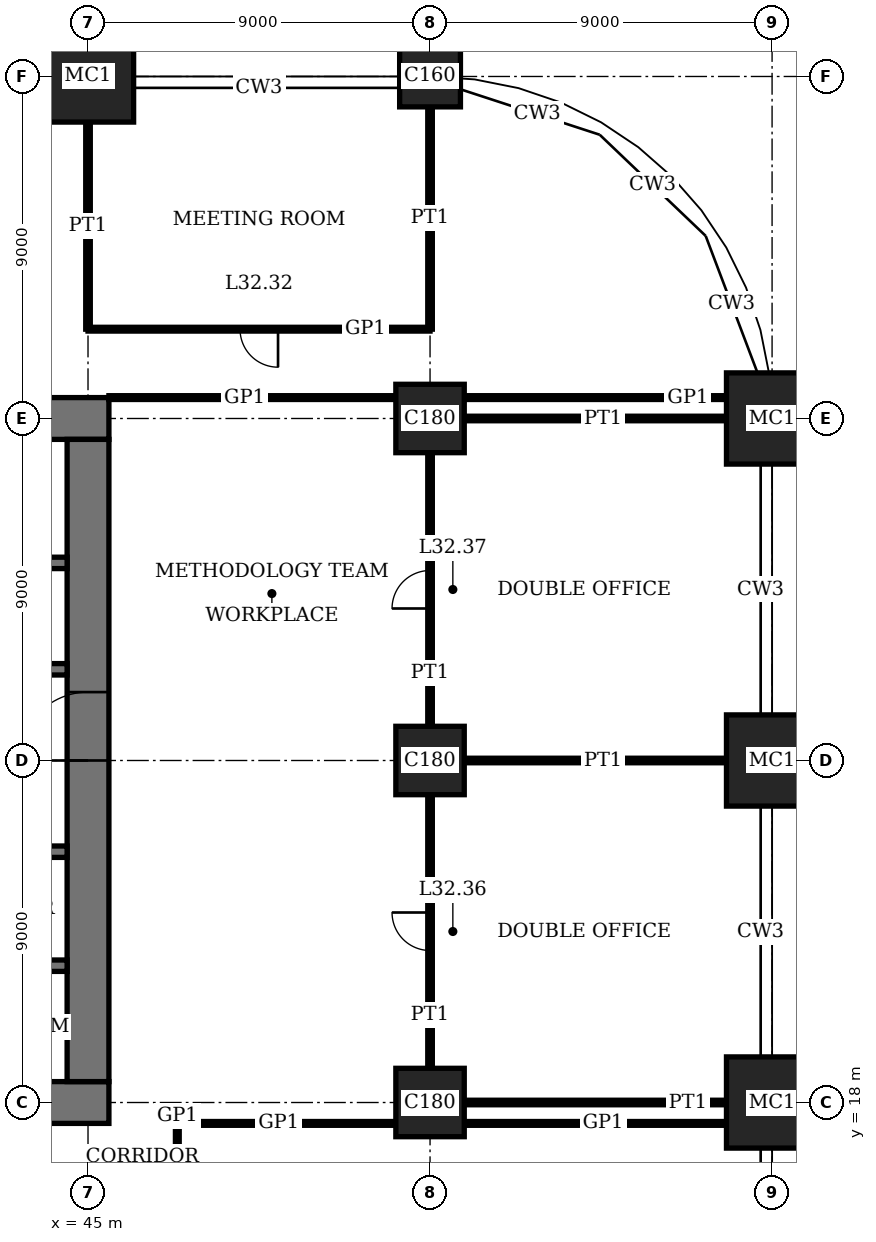
"""IFC4 building model, lengths in metres.
Left out: names, types, materials, properties, quantities, classifications, styles, units other than length and angle.
Written with IfcOpenShell. Run it as: python <this file> out.ifc"""

import sys

from ifc_helpers import new_model, si_unit, direction, frame, frame_2d, origin, origin_2d, place, context, subcontext, project, spatial, rectangle, extrude, element, fill, save


model = new_model("IFC4")
c1 = context("Model", 3, precision=1e-05, world=origin(), true_north=direction((0.0, 1.0)))
c2 = subcontext(c1, "Body", "Model", "MODEL_VIEW")
j1 = project(units=[si_unit("LENGTHUNIT", "METRE"), si_unit("PLANEANGLEUNIT", "RADIAN")], contexts=[c1])
p1 = place(None, origin())
s1 = spatial("IfcSite", under=j1, at=p1, CompositionType="ELEMENT")
p2 = place(p1, origin())
s2 = spatial("IfcBuilding", under=s1, at=p2, CompositionType="ELEMENT")
p3 = place(p2, frame((0.0, 0.0, 133.0)))
s3 = spatial("IfcBuildingStorey", under=s2, at=p3, CompositionType="ELEMENT", Elevation=133.0)
p4 = place(p3, frame((45.0, 45.0, 0.0), z_axis=(0.0, 0.0, 1.0), x_axis=(1.0, 0.0, 0.0)))
e1 = element("IfcColumn", 1, at=p4, inside=s3, PredefinedType="COLUMN", context=c2, shape_type="SweptSolid", body=[
    extrude(rectangle(XDim=2.4, YDim=2.4, at=origin_2d()), origin(), (0.0, 0.0, 1.0), 4.0),
])
for number, where, z_axis, x_axis in (
    (2, (54.0, 18.0, 0.0), (0.0, 0.0, 1.0), (1.0, 0.0, 0.0)),
    (3, (54.0, 27.0, 0.0), (0.0, 0.0, 1.0), (1.0, 0.0, 0.0)),
    (4, (54.0, 36.0, 0.0), (0.0, 0.0, 1.0), (1.0, 0.0, 0.0)),
):
    element("IfcColumn", number, at=place(p3, frame(where, z_axis=z_axis, x_axis=x_axis)), inside=s3, PredefinedType="COLUMN", context=c2, shape_type="SweptSolid", body=[
        extrude(rectangle(XDim=1.8, YDim=1.8, at=origin_2d()), origin(), (0.0, 0.0, 1.0), 4.0),
    ])
p5 = place(p3, frame((54.0, 45.0, 0.0), z_axis=(0.0, 0.0, 1.0), x_axis=(1.0, 0.0, 0.0)))
e5 = element("IfcColumn", 5, at=p5, inside=s3, PredefinedType="COLUMN", context=c2, shape_type="SweptSolid", body=[
    extrude(rectangle(XDim=1.6, YDim=1.6, at=origin_2d()), origin(), (0.0, 0.0, 1.0), 4.0),
])
for number, where, z_axis, x_axis in (
    (6, (63.0, 18.0, 0.0), (0.0, 0.0, 1.0), (1.0, 0.0, 0.0)),
    (7, (63.0, 27.0, 0.0), (0.0, 0.0, 1.0), (1.0, 0.0, 0.0)),
    (8, (63.0, 36.0, 0.0), (0.0, 0.0, 1.0), (1.0, 0.0, 0.0)),
):
    element("IfcColumn", number, at=place(p3, frame(where, z_axis=z_axis, x_axis=x_axis)), inside=s3, PredefinedType="COLUMN", context=c2, shape_type="SweptSolid", body=[
        extrude(rectangle(XDim=2.4, YDim=2.4, at=origin_2d()), origin(), (0.0, 0.0, 1.0), 4.0),
    ])
p6 = place(p3, frame((17.45, 18.0, 0.0), z_axis=(0.0, 0.0, 1.0), x_axis=(1.0, 0.0, 0.0)))
e9 = element("IfcWall", 9, at=p6, inside=s3, PredefinedType="SHEAR", context=c2, shape_type="SweptSolid", body=[
    extrude(rectangle(XDim=28.1, YDim=1.1, at=frame_2d((14.05, 0.0))), origin(), (0.0, 0.0, 1.0), 4.0),
])
p7 = place(p6, frame((11.55, 0.0, 0.0)))
e10 = element("IfcOpeningElement", 10, at=p7, cuts=e9, PredefinedType="OPENING", context=c2, shape_type="SweptSolid", body=[
    extrude(rectangle(XDim=1.0, YDim=2.4, at=frame_2d((0.5, 1.2))), frame((0.0, 0.56, 0.0), z_axis=(0.0, -1.0, 0.0), x_axis=(1.0, 0.0, 0.0)), (0.0, 0.0, 1.0), 1.12),
])
p8 = place(p6, frame((16.55, 0.0, 0.0)))
e11 = element("IfcOpeningElement", 11, at=p8, cuts=e9, PredefinedType="OPENING", context=c2, shape_type="SweptSolid", body=[
    extrude(rectangle(XDim=1.0, YDim=2.4, at=frame_2d((0.5, 1.2))), frame((0.0, 0.56, 0.0), z_axis=(0.0, -1.0, 0.0), x_axis=(1.0, 0.0, 0.0)), (0.0, 0.0, 1.0), 1.12),
])
p9 = place(p6, frame((20.0, 0.0, 0.0)))
e12 = element("IfcOpeningElement", 12, at=p9, cuts=e9, PredefinedType="OPENING", context=c2, shape_type="SweptSolid", body=[
    extrude(rectangle(XDim=1.1, YDim=2.4, at=frame_2d((0.55, 1.2))), frame((0.0, 0.56, 0.0), z_axis=(0.0, -1.0, 0.0), x_axis=(1.0, 0.0, 0.0)), (0.0, 0.0, 1.0), 1.12),
])
p10 = place(p6, frame((24.05, 0.0, 0.0)))
e13 = element("IfcOpeningElement", 13, at=p10, cuts=e9, PredefinedType="OPENING", context=c2, shape_type="SweptSolid", body=[
    extrude(rectangle(XDim=1.0, YDim=2.4, at=frame_2d((0.5, 1.2))), frame((0.0, 0.56, 0.0), z_axis=(0.0, -1.0, 0.0), x_axis=(1.0, 0.0, 0.0)), (0.0, 0.0, 1.0), 1.12),
])
p11 = place(p3, frame((45.55, 36.0, 0.0), z_axis=(0.0, 0.0, 1.0), x_axis=(-1.0, 0.0, 0.0)))
e14 = element("IfcWall", 14, at=p11, inside=s3, PredefinedType="SHEAR", context=c2, shape_type="SweptSolid", body=[
    extrude(rectangle(XDim=28.1, YDim=1.1, at=frame_2d((14.05, 0.0))), origin(), (0.0, 0.0, 1.0), 4.0),
])
p12 = place(p11, frame((11.55, 0.0, 0.0)))
e15 = element("IfcOpeningElement", 15, at=p12, cuts=e14, PredefinedType="OPENING", context=c2, shape_type="SweptSolid", body=[
    extrude(rectangle(XDim=1.0, YDim=2.4, at=frame_2d((0.5, 1.2))), frame((0.0, 0.56, 0.0), z_axis=(0.0, -1.0, 0.0), x_axis=(1.0, 0.0, 0.0)), (0.0, 0.0, 1.0), 1.12),
])
p13 = place(p11, frame((16.55, 0.0, 0.0)))
e16 = element("IfcOpeningElement", 16, at=p13, cuts=e14, PredefinedType="OPENING", context=c2, shape_type="SweptSolid", body=[
    extrude(rectangle(XDim=1.0, YDim=2.4, at=frame_2d((0.5, 1.2))), frame((0.0, 0.56, 0.0), z_axis=(0.0, -1.0, 0.0), x_axis=(1.0, 0.0, 0.0)), (0.0, 0.0, 1.0), 1.12),
])
p14 = place(p11, frame((20.0, 0.0, 0.0)))
e17 = element("IfcOpeningElement", 17, at=p14, cuts=e14, PredefinedType="OPENING", context=c2, shape_type="SweptSolid", body=[
    extrude(rectangle(XDim=1.1, YDim=2.4, at=frame_2d((0.55, 1.2))), frame((0.0, 0.56, 0.0), z_axis=(0.0, -1.0, 0.0), x_axis=(1.0, 0.0, 0.0)), (0.0, 0.0, 1.0), 1.12),
])
p15 = place(p11, frame((24.05, 0.0, 0.0)))
e18 = element("IfcOpeningElement", 18, at=p15, cuts=e14, PredefinedType="OPENING", context=c2, shape_type="SweptSolid", body=[
    extrude(rectangle(XDim=1.0, YDim=2.4, at=frame_2d((0.5, 1.2))), frame((0.0, 0.56, 0.0), z_axis=(0.0, -1.0, 0.0), x_axis=(1.0, 0.0, 0.0)), (0.0, 0.0, 1.0), 1.12),
])
p16 = place(p3, frame((45.0, 18.55, 0.0), z_axis=(0.0, 0.0, 1.0), x_axis=(0.0, 1.0, 0.0)))
e19 = element("IfcWall", 19, at=p16, inside=s3, PredefinedType="SHEAR", context=c2, shape_type="SweptSolid", body=[
    extrude(rectangle(XDim=16.9, YDim=1.1, at=frame_2d((8.45, 0.0))), origin(), (0.0, 0.0, 1.0), 4.0),
])
p17 = place(p16, frame((8.45, 0.0, 0.0)))
e20 = element("IfcOpeningElement", 20, at=p17, cuts=e19, PredefinedType="OPENING", context=c2, shape_type="SweptSolid", body=[
    extrude(rectangle(XDim=1.8, YDim=2.4, at=frame_2d((0.9, 1.2))), frame((0.0, 0.56, 0.0), z_axis=(0.0, -1.0, 0.0), x_axis=(1.0, 0.0, 0.0)), (0.0, 0.0, 1.0), 1.12),
])
p18 = place(p3, frame((36.15, 32.2, 0.0), z_axis=(0.0, 0.0, 1.0), x_axis=(1.0, 0.0, 0.0)))
e21 = element("IfcWall", 21, at=p18, inside=s3, PredefinedType="SHEAR", context=c2, shape_type="SweptSolid", body=[
    extrude(rectangle(XDim=8.3, YDim=0.3, at=frame_2d((4.15, 0.0))), origin(), (0.0, 0.0, 1.0), 4.0),
])
p19 = place(p18, frame((0.45, 0.0, 0.0)))
e22 = element("IfcOpeningElement", 22, at=p19, cuts=e21, PredefinedType="OPENING", context=c2, shape_type="SweptSolid", body=[
    extrude(rectangle(XDim=1.0, YDim=2.4, at=frame_2d((0.5, 1.2))), frame((0.0, 0.16, 0.0), z_axis=(0.0, -1.0, 0.0), x_axis=(1.0, 0.0, 0.0)), (0.0, 0.0, 1.0), 0.32),
])
p20 = place(p3, frame((18.55, 24.6, 0.0), z_axis=(0.0, 0.0, 1.0), x_axis=(1.0, 0.0, 0.0)))
e23 = element("IfcWall", 23, at=p20, inside=s3, PredefinedType="SHEAR", context=c2, shape_type="SweptSolid", body=[
    extrude(rectangle(XDim=25.9, YDim=0.3, at=frame_2d((12.95, 0.0))), origin(), (0.0, 0.0, 1.0), 4.0),
])
p21 = place(p20, frame((4.95, 0.0, 0.0)))
e24 = element("IfcOpeningElement", 24, at=p21, cuts=e23, PredefinedType="OPENING", context=c2, shape_type="SweptSolid", body=[
    extrude(rectangle(XDim=1.0, YDim=2.4, at=frame_2d((0.5, 1.2))), frame((0.0, 0.16, 0.0), z_axis=(0.0, -1.0, 0.0), x_axis=(1.0, 0.0, 0.0)), (0.0, 0.0, 1.0), 0.32),
])
p22 = place(p20, frame((24.5, 0.0, 0.0)))
e25 = element("IfcOpeningElement", 25, at=p22, cuts=e23, PredefinedType="OPENING", context=c2, shape_type="SweptSolid", body=[
    extrude(rectangle(XDim=0.9, YDim=2.1, at=frame_2d((0.45, 1.05))), frame((0.0, 0.16, 0.0), z_axis=(0.0, -1.0, 0.0), x_axis=(1.0, 0.0, 0.0)), (0.0, 0.0, 1.0), 0.32),
])
p23 = place(p20, frame((21.3, 0.0, 0.0)))
e26 = element("IfcOpeningElement", 26, at=p23, cuts=e23, PredefinedType="OPENING", context=c2, shape_type="SweptSolid", body=[
    extrude(rectangle(XDim=1.3, YDim=2.4, at=frame_2d((0.65, 1.2))), frame((0.0, 0.16, 0.0), z_axis=(0.0, -1.0, 0.0), x_axis=(1.0, 0.0, 0.0)), (0.0, 0.0, 1.0), 0.32),
])
p24 = place(p3, frame((18.55, 29.4, 0.0), z_axis=(0.0, 0.0, 1.0), x_axis=(1.0, 0.0, 0.0)))
e27 = element("IfcWall", 27, at=p24, inside=s3, PredefinedType="SHEAR", context=c2, shape_type="SweptSolid", body=[
    extrude(rectangle(XDim=25.9, YDim=0.3, at=frame_2d((12.95, 0.0))), origin(), (0.0, 0.0, 1.0), 4.0),
])
p25 = place(p24, frame((19.95, 0.0, 0.0)))
e28 = element("IfcOpeningElement", 28, at=p25, cuts=e27, PredefinedType="OPENING", context=c2, shape_type="SweptSolid", body=[
    extrude(rectangle(XDim=1.0, YDim=2.4, at=frame_2d((0.5, 1.2))), frame((0.0, 0.16, 0.0), z_axis=(0.0, -1.0, 0.0), x_axis=(1.0, 0.0, 0.0)), (0.0, 0.0, 1.0), 0.32),
])
p26 = place(p24, frame((0.5, 0.0, 0.0)))
e29 = element("IfcOpeningElement", 29, at=p26, cuts=e27, PredefinedType="OPENING", context=c2, shape_type="SweptSolid", body=[
    extrude(rectangle(XDim=0.9, YDim=2.1, at=frame_2d((0.45, 1.05))), frame((0.0, 0.16, 0.0), z_axis=(0.0, -1.0, 0.0), x_axis=(1.0, 0.0, 0.0)), (0.0, 0.0, 1.0), 0.32),
])
p27 = place(p24, frame((15.4, 0.0, 0.0)))
e30 = element("IfcOpeningElement", 30, at=p27, cuts=e27, PredefinedType="OPENING", context=c2, shape_type="SweptSolid", body=[
    extrude(rectangle(XDim=1.1, YDim=2.4, at=frame_2d((0.55, 1.2))), frame((0.0, 0.16, 0.0), z_axis=(0.0, -1.0, 0.0), x_axis=(1.0, 0.0, 0.0)), (0.0, 0.0, 1.0), 0.32),
])
p28 = place(p24, frame((12.4, 0.0, 0.0)))
e31 = element("IfcOpeningElement", 31, at=p28, cuts=e27, PredefinedType="OPENING", context=c2, shape_type="SweptSolid", body=[
    extrude(rectangle(XDim=1.1, YDim=2.4, at=frame_2d((0.55, 1.2))), frame((0.0, 0.16, 0.0), z_axis=(0.0, -1.0, 0.0), x_axis=(1.0, 0.0, 0.0)), (0.0, 0.0, 1.0), 0.32),
])
p29 = place(p24, frame((3.3, 0.0, 0.0)))
e32 = element("IfcOpeningElement", 32, at=p29, cuts=e27, PredefinedType="OPENING", context=c2, shape_type="SweptSolid", body=[
    extrude(rectangle(XDim=1.3, YDim=2.4, at=frame_2d((0.65, 1.2))), frame((0.0, 0.16, 0.0), z_axis=(0.0, -1.0, 0.0), x_axis=(1.0, 0.0, 0.0)), (0.0, 0.0, 1.0), 0.32),
])
p30 = place(p3, frame((27.15, 21.6, 0.0), z_axis=(0.0, 0.0, 1.0), x_axis=(1.0, 0.0, 0.0)))
e33 = element("IfcWall", 33, at=p30, inside=s3, PredefinedType="SHEAR", context=c2, shape_type="SweptSolid", body=[
    extrude(rectangle(XDim=17.3, YDim=0.3, at=frame_2d((8.65, 0.0))), origin(), (0.0, 0.0, 1.0), 4.0),
])
p31 = place(p3, frame((47.35, 17.45, 0.0), z_axis=(0.0, 0.0, 1.0), x_axis=(1.0, 0.0, 0.0)))
e34 = element("IfcWall", 34, at=p31, inside=s3, PredefinedType="PARTITIONING", context=c2, shape_type="SweptSolid", body=[
    extrude(rectangle(XDim=5.75, YDim=0.1, at=frame_2d((2.875, 0.0))), origin(), (0.0, 0.0, 1.0), 3.75),
])
p32 = place(p3, frame((54.9, 17.45, 0.0), z_axis=(0.0, 0.0, 1.0), x_axis=(1.0, 0.0, 0.0)))
e35 = element("IfcWall", 35, at=p32, inside=s3, PredefinedType="PARTITIONING", context=c2, shape_type="SweptSolid", body=[
    extrude(rectangle(XDim=6.9, YDim=0.1, at=frame_2d((3.45, 0.0))), origin(), (0.0, 0.0, 1.0), 3.75),
])
for number, where, z_axis, x_axis in (
    (36, (54.9, 18.0, 0.0), (0.0, 0.0, 1.0), (1.0, 0.0, 0.0)),
    (37, (54.9, 27.0, 0.0), (0.0, 0.0, 1.0), (1.0, 0.0, 0.0)),
    (38, (54.9, 36.0, 0.0), (0.0, 0.0, 1.0), (1.0, 0.0, 0.0)),
):
    element("IfcWall", number, at=place(p3, frame(where, z_axis=z_axis, x_axis=x_axis)), inside=s3, PredefinedType="PARTITIONING", context=c2, shape_type="SweptSolid", body=[
        extrude(rectangle(XDim=6.9, YDim=0.12, at=frame_2d((3.45, 0.0))), origin(), (0.0, 0.0, 1.0), 3.05),
    ])
p33 = place(p3, frame((45.55, 36.55, 0.0), z_axis=(0.0, 0.0, 1.0), x_axis=(1.0, 0.0, 0.0)))
e39 = element("IfcWall", 39, at=p33, inside=s3, PredefinedType="PARTITIONING", context=c2, shape_type="SweptSolid", body=[
    extrude(rectangle(XDim=7.55, YDim=0.1, at=frame_2d((3.775, 0.0))), origin(), (0.0, 0.0, 1.0), 3.75),
])
p34 = place(p3, frame((54.9, 36.55, 0.0), z_axis=(0.0, 0.0, 1.0), x_axis=(1.0, 0.0, 0.0)))
e40 = element("IfcWall", 40, at=p34, inside=s3, PredefinedType="PARTITIONING", context=c2, shape_type="SweptSolid", body=[
    extrude(rectangle(XDim=6.9, YDim=0.1, at=frame_2d((3.45, 0.0))), origin(), (0.0, 0.0, 1.0), 3.75),
])
p35 = place(p3, frame((45.0, 38.35, 0.0), z_axis=(0.0, 0.0, 1.0), x_axis=(1.0, 0.0, 0.0)))
e41 = element("IfcWall", 41, at=p35, inside=s3, PredefinedType="PARTITIONING", context=c2, shape_type="SweptSolid", body=[
    extrude(rectangle(XDim=9.0, YDim=0.1, at=frame_2d((4.5, 0.0))), origin(), (0.0, 0.0, 1.0), 3.75),
])
p36 = place(p35, frame((4.0, 0.0, 0.0)))
e42 = element("IfcOpeningElement", 42, at=p36, cuts=e41, PredefinedType="OPENING", context=c2, shape_type="SweptSolid", body=[
    extrude(rectangle(XDim=1.0, YDim=2.4, at=frame_2d((0.5, 1.2))), frame((0.0, 0.06, 0.0), z_axis=(0.0, -1.0, 0.0), x_axis=(1.0, 0.0, 0.0)), (0.0, 0.0, 1.0), 0.12),
])
p37 = place(p3, frame((45.0, 38.35, 0.0), z_axis=(0.0, 0.0, 1.0), x_axis=(0.0, 1.0, 0.0)))
e43 = element("IfcWall", 43, at=p37, inside=s3, PredefinedType="PARTITIONING", context=c2, shape_type="SweptSolid", body=[
    extrude(rectangle(XDim=5.45, YDim=0.12, at=frame_2d((2.725, 0.0))), origin(), (0.0, 0.0, 1.0), 3.05),
])
p38 = place(p3, frame((47.35, 15.65, 0.0), z_axis=(0.0, 0.0, 1.0), x_axis=(0.0, 1.0, 0.0)))
e44 = element("IfcWall", 44, at=p38, inside=s3, PredefinedType="PARTITIONING", context=c2, shape_type="SweptSolid", body=[
    extrude(rectangle(XDim=1.8, YDim=0.1, at=frame_2d((0.9, 0.0))), origin(), (0.0, 0.0, 1.0), 3.75),
])
p39 = place(p3, frame((54.0, 18.9, 0.0), z_axis=(0.0, 0.0, 1.0), x_axis=(0.0, 1.0, 0.0)))
e45 = element("IfcWall", 45, at=p39, inside=s3, PredefinedType="PARTITIONING", context=c2, shape_type="SweptSolid", body=[
    extrude(rectangle(XDim=7.2, YDim=0.12, at=frame_2d((3.6, 0.0))), origin(), (0.0, 0.0, 1.0), 3.05),
])
p40 = place(p39, frame((3.1, 0.0, 0.0)))
e46 = element("IfcOpeningElement", 46, at=p40, cuts=e45, PredefinedType="OPENING", context=c2, shape_type="SweptSolid", body=[
    extrude(rectangle(XDim=1.0, YDim=2.4, at=frame_2d((0.5, 1.2))), frame((0.0, 0.07, 0.0), z_axis=(0.0, -1.0, 0.0), x_axis=(1.0, 0.0, 0.0)), (0.0, 0.0, 1.0), 0.14),
])
p41 = place(p3, frame((54.0, 27.9, 0.0), z_axis=(0.0, 0.0, 1.0), x_axis=(0.0, 1.0, 0.0)))
e47 = element("IfcWall", 47, at=p41, inside=s3, PredefinedType="PARTITIONING", context=c2, shape_type="SweptSolid", body=[
    extrude(rectangle(XDim=7.2, YDim=0.12, at=frame_2d((3.6, 0.0))), origin(), (0.0, 0.0, 1.0), 3.05),
])
p42 = place(p41, frame((3.1, 0.0, 0.0)))
e48 = element("IfcOpeningElement", 48, at=p42, cuts=e47, PredefinedType="OPENING", context=c2, shape_type="SweptSolid", body=[
    extrude(rectangle(XDim=1.0, YDim=2.4, at=frame_2d((0.5, 1.2))), frame((0.0, 0.07, 0.0), z_axis=(0.0, -1.0, 0.0), x_axis=(1.0, 0.0, 0.0)), (0.0, 0.0, 1.0), 0.14),
])
p43 = place(p3, frame((54.0, 38.35, 0.0), z_axis=(0.0, 0.0, 1.0), x_axis=(0.0, 1.0, 0.0)))
e49 = element("IfcWall", 49, at=p43, inside=s3, PredefinedType="PARTITIONING", context=c2, shape_type="SweptSolid", body=[
    extrude(rectangle(XDim=5.85, YDim=0.12, at=frame_2d((2.925, 0.0))), origin(), (0.0, 0.0, 1.0), 3.05),
])
p44 = place(p17, origin())
e50 = element("IfcDoor", 50, at=p44, inside=s3, OperationType="DOUBLE_DOOR_DOUBLE_SWING", PredefinedType="DOOR", context=c2, shape_type="SweptSolid", body=[
    extrude(rectangle(XDim=1.8, YDim=2.4, at=frame_2d((0.9, 1.2))), frame((0.0, 0.03, 0.0), z_axis=(0.0, -1.0, 0.0), x_axis=(1.0, 0.0, 0.0)), (0.0, 0.0, 1.0), 0.06),
    extrude(rectangle(XDim=0.04, YDim=2.4, at=frame_2d((0.02, 1.2))), frame((0.0, 0.55, 0.0), z_axis=(0.0, -1.0, 0.0), x_axis=(1.0, 0.0, 0.0)), (0.0, 0.0, 1.0), 1.1),
    extrude(rectangle(XDim=0.04, YDim=2.4, at=frame_2d((1.78, 1.2))), frame((0.0, 0.55, 0.0), z_axis=(0.0, -1.0, 0.0), x_axis=(1.0, 0.0, 0.0)), (0.0, 0.0, 1.0), 1.1),
    extrude(rectangle(XDim=1.8, YDim=0.04, at=frame_2d((0.9, 2.38))), frame((0.0, 0.55, 0.0), z_axis=(0.0, -1.0, 0.0), x_axis=(1.0, 0.0, 0.0)), (0.0, 0.0, 1.0), 1.1),
])
fill(e20, e50)
p45 = place(p36, origin())
e51 = element("IfcDoor", 51, at=p45, inside=s3, OperationType="SINGLE_SWING_RIGHT", PredefinedType="DOOR", context=c2, shape_type="SweptSolid", body=[
    extrude(rectangle(XDim=1.0, YDim=2.4, at=frame_2d((0.5, 1.2))), frame((0.0, 0.02, 0.0), z_axis=(0.0, -1.0, 0.0), x_axis=(1.0, 0.0, 0.0)), (0.0, 0.0, 1.0), 0.04),
])
fill(e42, e51)
p46 = place(p40, origin())
e52 = element("IfcDoor", 52, at=p46, inside=s3, OperationType="SINGLE_SWING_LEFT", PredefinedType="DOOR", context=c2, shape_type="SweptSolid", body=[
    extrude(rectangle(XDim=1.0, YDim=2.4, at=frame_2d((0.5, 1.2))), frame((0.0, 0.025, 0.0), z_axis=(0.0, -1.0, 0.0), x_axis=(1.0, 0.0, 0.0)), (0.0, 0.0, 1.0), 0.05),
])
fill(e46, e52)
p47 = place(p42, origin())
e53 = element("IfcDoor", 53, at=p47, inside=s3, OperationType="SINGLE_SWING_RIGHT", PredefinedType="DOOR", context=c2, shape_type="SweptSolid", body=[
    extrude(rectangle(XDim=1.0, YDim=2.4, at=frame_2d((0.5, 1.2))), frame((0.0, 0.025, 0.0), z_axis=(0.0, -1.0, 0.0), x_axis=(1.0, 0.0, 0.0)), (0.0, 0.0, 1.0), 0.05),
])
fill(e48, e53)
save(model, sys.argv[1])
